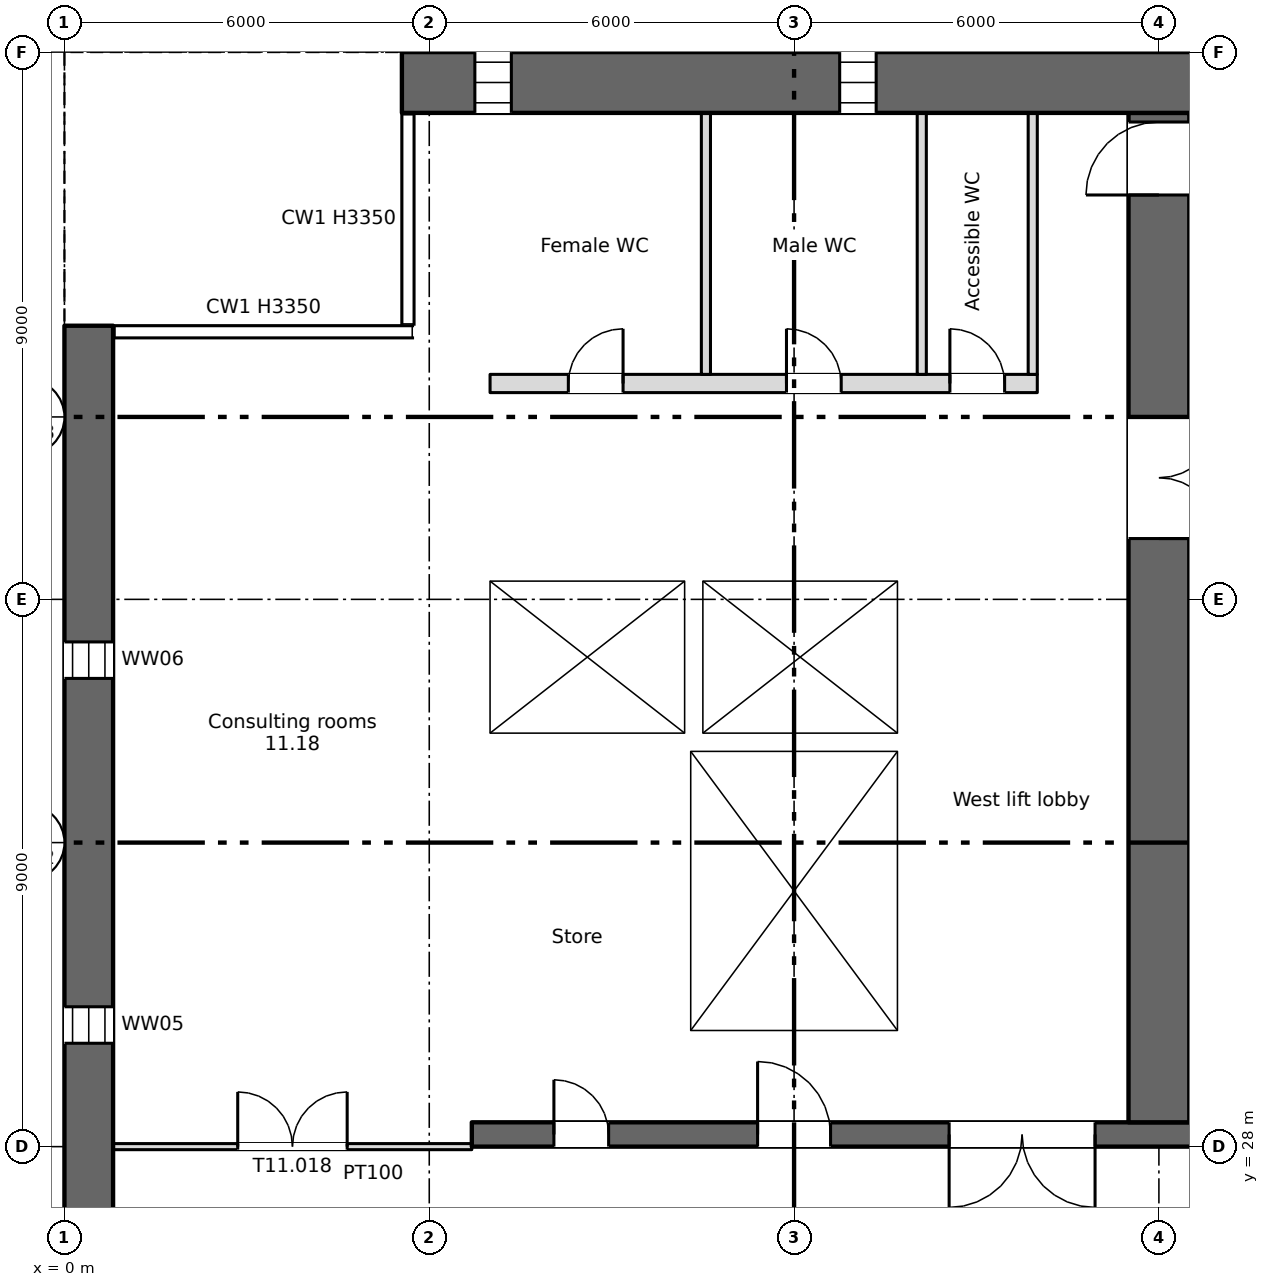
"""IFC4 building model, lengths in metres.
Left out: names, types, materials, properties, quantities, classifications, styles, units other than length and angle.
Written with IfcOpenShell. Run it as: python <this file> out.ifc"""

import sys

from ifc_helpers import new_model, si_unit, direction, frame, frame_2d, origin, place, context, subcontext, project, spatial, rectangle, extrude, element, fill, save


model = new_model("IFC4")
c1 = context("Model", 3, precision=1e-05, world=origin(), true_north=direction((0.0, 1.0)))
c2 = subcontext(c1, "Body", "Model", "MODEL_VIEW")
j1 = project(units=[si_unit("LENGTHUNIT", "METRE"), si_unit("PLANEANGLEUNIT", "RADIAN")], contexts=[c1])
p1 = place(None, origin())
s1 = spatial("IfcSite", under=j1, at=p1, CompositionType="ELEMENT")
p2 = place(p1, origin())
s2 = spatial("IfcBuilding", under=s1, at=p2, CompositionType="ELEMENT")
p3 = place(p2, frame((0.0, 0.0, 52.5)))
s3 = spatial("IfcBuildingStorey", under=s2, at=p3, CompositionType="ELEMENT", Elevation=52.5)
p4 = place(p3, frame((0.4, 4.5, 0.0), z_axis=(0.0, 0.0, 1.0), x_axis=(0.0, 1.0, 0.0)))
e1 = element("IfcWall", 1, at=p4, inside=s3, PredefinedType="SHEAR", context=c2, shape_type="SweptSolid", body=[
    extrude(rectangle(XDim=37.0, YDim=0.8, at=frame_2d((18.5, 0.0))), origin(), (0.0, 0.0, 1.0), 3.35),
])
p5 = place(p4, frame((1.2, 0.0, 0.6)))
e2 = element("IfcOpeningElement", 2, at=p5, cuts=e1, PredefinedType="OPENING", context=c2, shape_type="SweptSolid", body=[
    extrude(rectangle(XDim=0.6, YDim=2.4, at=frame_2d((0.3, 1.2))), frame((0.0, 0.41, 0.0), z_axis=(0.0, -1.0, 0.0), x_axis=(1.0, 0.0, 0.0)), (0.0, 0.0, 1.0), 0.82),
])
p6 = place(p4, frame((7.2, 0.0, 0.6)))
e3 = element("IfcOpeningElement", 3, at=p6, cuts=e1, PredefinedType="OPENING", context=c2, shape_type="SweptSolid", body=[
    extrude(rectangle(XDim=0.6, YDim=2.4, at=frame_2d((0.3, 1.2))), frame((0.0, 0.41, 0.0), z_axis=(0.0, -1.0, 0.0), x_axis=(1.0, 0.0, 0.0)), (0.0, 0.0, 1.0), 0.82),
])
p7 = place(p4, frame((13.2, 0.0, 0.6)))
e4 = element("IfcOpeningElement", 4, at=p7, cuts=e1, PredefinedType="OPENING", context=c2, shape_type="SweptSolid", body=[
    extrude(rectangle(XDim=0.6, YDim=2.4, at=frame_2d((0.3, 1.2))), frame((0.0, 0.41, 0.0), z_axis=(0.0, -1.0, 0.0), x_axis=(1.0, 0.0, 0.0)), (0.0, 0.0, 1.0), 0.82),
])
p8 = place(p4, frame((19.2, 0.0, 0.6)))
e5 = element("IfcOpeningElement", 5, at=p8, cuts=e1, PredefinedType="OPENING", context=c2, shape_type="SweptSolid", body=[
    extrude(rectangle(XDim=0.6, YDim=2.4, at=frame_2d((0.3, 1.2))), frame((0.0, 0.41, 0.0), z_axis=(0.0, -1.0, 0.0), x_axis=(1.0, 0.0, 0.0)), (0.0, 0.0, 1.0), 0.82),
])
p9 = place(p4, frame((25.2, 0.0, 0.6)))
e6 = element("IfcOpeningElement", 6, at=p9, cuts=e1, PredefinedType="OPENING", context=c2, shape_type="SweptSolid", body=[
    extrude(rectangle(XDim=0.6, YDim=2.4, at=frame_2d((0.3, 1.2))), frame((0.0, 0.41, 0.0), z_axis=(0.0, -1.0, 0.0), x_axis=(1.0, 0.0, 0.0)), (0.0, 0.0, 1.0), 0.82),
])
p10 = place(p4, frame((31.2, 0.0, 0.6)))
e7 = element("IfcOpeningElement", 7, at=p10, cuts=e1, PredefinedType="OPENING", context=c2, shape_type="SweptSolid", body=[
    extrude(rectangle(XDim=0.6, YDim=2.4, at=frame_2d((0.3, 1.2))), frame((0.0, 0.41, 0.0), z_axis=(0.0, -1.0, 0.0), x_axis=(1.0, 0.0, 0.0)), (0.0, 0.0, 1.0), 0.82),
])
p11 = place(p3, frame((5.55, 45.5, 0.0), z_axis=(0.0, 0.0, 1.0), x_axis=(1.0, 0.0, 0.0)))
e8 = element("IfcWall", 8, at=p11, inside=s3, PredefinedType="SHEAR", context=c2, shape_type="SweptSolid", body=[
    extrude(rectangle(XDim=66.9, YDim=1.0, at=frame_2d((33.45, 0.0))), origin(), (0.0, 0.0, 1.0), 3.35),
])
p12 = place(p11, frame((1.2, 0.0, 0.6)))
e9 = element("IfcOpeningElement", 9, at=p12, cuts=e8, PredefinedType="OPENING", context=c2, shape_type="SweptSolid", body=[
    extrude(rectangle(XDim=0.6, YDim=2.4, at=frame_2d((0.3, 1.2))), frame((0.0, 0.51, 0.0), z_axis=(0.0, -1.0, 0.0), x_axis=(1.0, 0.0, 0.0)), (0.0, 0.0, 1.0), 1.02),
])
p13 = place(p11, frame((7.2, 0.0, 0.6)))
e10 = element("IfcOpeningElement", 10, at=p13, cuts=e8, PredefinedType="OPENING", context=c2, shape_type="SweptSolid", body=[
    extrude(rectangle(XDim=0.6, YDim=2.4, at=frame_2d((0.3, 1.2))), frame((0.0, 0.51, 0.0), z_axis=(0.0, -1.0, 0.0), x_axis=(1.0, 0.0, 0.0)), (0.0, 0.0, 1.0), 1.02),
])
p14 = place(p11, frame((61.2, 0.0, 0.6)))
e11 = element("IfcOpeningElement", 11, at=p14, cuts=e8, PredefinedType="OPENING", context=c2, shape_type="SweptSolid", body=[
    extrude(rectangle(XDim=0.6, YDim=2.4, at=frame_2d((0.3, 1.2))), frame((0.0, 0.51, 0.0), z_axis=(0.0, -1.0, 0.0), x_axis=(1.0, 0.0, 0.0)), (0.0, 0.0, 1.0), 1.02),
])
p15 = place(p3, frame((6.7, 28.2, 0.0), z_axis=(0.0, 0.0, 1.0), x_axis=(1.0, 0.0, 0.0)))
e12 = element("IfcWall", 12, at=p15, inside=s3, PredefinedType="SHEAR", context=c2, shape_type="SweptSolid", body=[
    extrude(rectangle(XDim=57.8, YDim=0.4, at=frame_2d((28.9, 0.0))), origin(), (0.0, 0.0, 1.0), 3.35),
])
p16 = place(p15, frame((13.85, 0.0, 0.0)))
e13 = element("IfcOpeningElement", 13, at=p16, cuts=e12, PredefinedType="OPENING", context=c2, shape_type="SweptSolid", body=[
    extrude(rectangle(XDim=0.9, YDim=2.1, at=frame_2d((0.45, 1.05))), frame((0.0, 0.21, 0.0), z_axis=(0.0, -1.0, 0.0), x_axis=(1.0, 0.0, 0.0)), (0.0, 0.0, 1.0), 0.42),
])
p17 = place(p15, frame((48.562, 0.0, 0.0)))
e14 = element("IfcOpeningElement", 14, at=p17, cuts=e12, PredefinedType="OPENING", context=c2, shape_type="SweptSolid", body=[
    extrude(rectangle(XDim=0.9, YDim=2.1, at=frame_2d((0.45, 1.05))), frame((0.0, 0.21, 0.0), z_axis=(0.0, -1.0, 0.0), x_axis=(1.0, 0.0, 0.0)), (0.0, 0.0, 1.0), 0.42),
])
p18 = place(p15, frame((51.137, 0.0, 0.0)))
e15 = element("IfcOpeningElement", 15, at=p18, cuts=e12, PredefinedType="OPENING", context=c2, shape_type="SweptSolid", body=[
    extrude(rectangle(XDim=0.9, YDim=2.1, at=frame_2d((0.45, 1.05))), frame((0.0, 0.21, 0.0), z_axis=(0.0, -1.0, 0.0), x_axis=(1.0, 0.0, 0.0)), (0.0, 0.0, 1.0), 0.42),
])
p19 = place(p15, frame((1.35, 0.0, 0.0)))
e16 = element("IfcOpeningElement", 16, at=p19, cuts=e12, PredefinedType="OPENING", context=c2, shape_type="SweptSolid", body=[
    extrude(rectangle(XDim=0.9, YDim=2.1, at=frame_2d((0.45, 1.05))), frame((0.0, 0.21, 0.0), z_axis=(0.0, -1.0, 0.0), x_axis=(1.0, 0.0, 0.0)), (0.0, 0.0, 1.0), 0.42),
])
p20 = place(p15, frame((4.7, 0.0, 0.0)))
e17 = element("IfcOpeningElement", 17, at=p20, cuts=e12, PredefinedType="OPENING", context=c2, shape_type="SweptSolid", body=[
    extrude(rectangle(XDim=1.2, YDim=2.1, at=frame_2d((0.6, 1.05))), frame((0.0, 0.21, 0.0), z_axis=(0.0, -1.0, 0.0), x_axis=(1.0, 0.0, 0.0)), (0.0, 0.0, 1.0), 0.42),
])
p21 = place(p15, frame((31.7, 0.0, 0.0)))
e18 = element("IfcOpeningElement", 18, at=p21, cuts=e12, PredefinedType="OPENING", context=c2, shape_type="SweptSolid", body=[
    extrude(rectangle(XDim=1.2, YDim=2.1, at=frame_2d((0.6, 1.05))), frame((0.0, 0.21, 0.0), z_axis=(0.0, -1.0, 0.0), x_axis=(1.0, 0.0, 0.0)), (0.0, 0.0, 1.0), 0.42),
])
p22 = place(p15, frame((55.2, 0.0, 0.0)))
e19 = element("IfcOpeningElement", 19, at=p22, cuts=e12, PredefinedType="OPENING", context=c2, shape_type="SweptSolid", body=[
    extrude(rectangle(XDim=1.2, YDim=2.1, at=frame_2d((0.6, 1.05))), frame((0.0, 0.21, 0.0), z_axis=(0.0, -1.0, 0.0), x_axis=(1.0, 0.0, 0.0)), (0.0, 0.0, 1.0), 0.42),
])
p23 = place(p15, frame((21.7, 0.0, 0.0)))
e20 = element("IfcOpeningElement", 20, at=p23, cuts=e12, PredefinedType="OPENING", context=c2, shape_type="SweptSolid", body=[
    extrude(rectangle(XDim=1.2, YDim=2.1, at=frame_2d((0.6, 1.05))), frame((0.0, 0.21, 0.0), z_axis=(0.0, -1.0, 0.0), x_axis=(1.0, 0.0, 0.0)), (0.0, 0.0, 1.0), 0.42),
])
p24 = place(p15, frame((41.7, 0.0, 0.0)))
e21 = element("IfcOpeningElement", 21, at=p24, cuts=e12, PredefinedType="OPENING", context=c2, shape_type="SweptSolid", body=[
    extrude(rectangle(XDim=1.2, YDim=2.1, at=frame_2d((0.6, 1.05))), frame((0.0, 0.21, 0.0), z_axis=(0.0, -1.0, 0.0), x_axis=(1.0, 0.0, 0.0)), (0.0, 0.0, 1.0), 0.42),
])
p25 = place(p15, frame((24.85, 0.0, 0.0)))
e22 = element("IfcOpeningElement", 22, at=p25, cuts=e12, PredefinedType="OPENING", context=c2, shape_type="SweptSolid", body=[
    extrude(rectangle(XDim=2.4, YDim=2.1, at=frame_2d((1.2, 1.05))), frame((0.0, 0.21, 0.0), z_axis=(0.0, -1.0, 0.0), x_axis=(1.0, 0.0, 0.0)), (0.0, 0.0, 1.0), 0.42),
])
p26 = place(p15, frame((37.35, 0.0, 0.0)))
e23 = element("IfcOpeningElement", 23, at=p26, cuts=e12, PredefinedType="OPENING", context=c2, shape_type="SweptSolid", body=[
    extrude(rectangle(XDim=2.4, YDim=2.1, at=frame_2d((1.2, 1.05))), frame((0.0, 0.21, 0.0), z_axis=(0.0, -1.0, 0.0), x_axis=(1.0, 0.0, 0.0)), (0.0, 0.0, 1.0), 0.42),
])
p27 = place(p15, frame((7.85, 0.0, 0.0)))
e24 = element("IfcOpeningElement", 24, at=p27, cuts=e12, PredefinedType="OPENING", context=c2, shape_type="SweptSolid", body=[
    extrude(rectangle(XDim=2.4, YDim=2.1, at=frame_2d((1.2, 1.05))), frame((0.0, 0.21, 0.0), z_axis=(0.0, -1.0, 0.0), x_axis=(1.0, 0.0, 0.0)), (0.0, 0.0, 1.0), 0.42),
])
p28 = place(p15, frame((28.85, 0.0, 0.0)))
e25 = element("IfcOpeningElement", 25, at=p28, cuts=e12, PredefinedType="OPENING", context=c2, shape_type="SweptSolid", body=[
    extrude(rectangle(XDim=0.9, YDim=2.1, at=frame_2d((0.45, 1.05))), frame((0.0, 0.21, 0.0), z_axis=(0.0, -1.0, 0.0), x_axis=(1.0, 0.0, 0.0)), (0.0, 0.0, 1.0), 0.42),
])
p29 = place(p15, frame((34.85, 0.0, 0.0)))
e26 = element("IfcOpeningElement", 26, at=p29, cuts=e12, PredefinedType="OPENING", context=c2, shape_type="SweptSolid", body=[
    extrude(rectangle(XDim=0.9, YDim=2.1, at=frame_2d((0.45, 1.05))), frame((0.0, 0.21, 0.0), z_axis=(0.0, -1.0, 0.0), x_axis=(1.0, 0.0, 0.0)), (0.0, 0.0, 1.0), 0.42),
])
p30 = place(p3, frame((6.85, 28.4, 0.0), z_axis=(0.0, 0.0, 1.0), x_axis=(0.0, 1.0, 0.0)))
e27 = element("IfcWall", 27, at=p30, inside=s3, PredefinedType="SHEAR", context=c2, shape_type="SweptSolid", body=[
    extrude(rectangle(XDim=16.6, YDim=0.3, at=frame_2d((8.3, 0.0))), origin(), (0.0, 0.0, 1.0), 3.35),
])
p31 = place(p3, frame((18.0, 28.4, 0.0), z_axis=(0.0, 0.0, 1.0), x_axis=(0.0, 1.0, 0.0)))
e28 = element("IfcWall", 28, at=p31, inside=s3, PredefinedType="SHEAR", context=c2, shape_type="SweptSolid", body=[
    extrude(rectangle(XDim=16.6, YDim=1.0, at=frame_2d((8.3, 0.0))), origin(), (0.0, 0.0, 1.0), 3.35),
])
p32 = place(p31, frame((9.6, 0.0, 0.0)))
e29 = element("IfcOpeningElement", 29, at=p32, cuts=e28, PredefinedType="OPENING", context=c2, shape_type="SweptSolid", body=[
    extrude(rectangle(XDim=2.0, YDim=2.1, at=frame_2d((1.0, 1.05))), frame((0.0, 0.51, 0.0), z_axis=(0.0, -1.0, 0.0), x_axis=(1.0, 0.0, 0.0)), (0.0, 0.0, 1.0), 1.02),
])
p33 = place(p31, frame((15.25, 0.0, 0.0)))
e30 = element("IfcOpeningElement", 30, at=p33, cuts=e28, PredefinedType="OPENING", context=c2, shape_type="SweptSolid", body=[
    extrude(rectangle(XDim=1.2, YDim=2.1, at=frame_2d((0.6, 1.05))), frame((0.0, 0.51, 0.0), z_axis=(0.0, -1.0, 0.0), x_axis=(1.0, 0.0, 0.0)), (0.0, 0.0, 1.0), 1.02),
])
for number, where, z_axis, x_axis in (
    (31, (10.15, 28.4, 0.0), (0.0, 0.0, 1.0), (0.0, 1.0, 0.0)),
    (32, (13.85, 28.4, 0.0), (0.0, 0.0, 1.0), (0.0, 1.0, 0.0)),
):
    element("IfcWall", number, at=place(p3, frame(where, z_axis=z_axis, x_axis=x_axis)), inside=s3, PredefinedType="SHEAR", context=c2, shape_type="SweptSolid", body=[
        extrude(rectangle(XDim=6.1, YDim=0.3, at=frame_2d((3.05, 0.0))), origin(), (0.0, 0.0, 1.0), 3.35),
    ])
for number, where, z_axis, x_axis in (
    (33, (7.0, 34.65, 0.0), (0.0, 0.0, 1.0), (1.0, 0.0, 0.0)),
    (34, (7.0, 37.45, 0.0), (0.0, 0.0, 1.0), (1.0, 0.0, 0.0)),
):
    element("IfcWall", number, at=place(p3, frame(where, z_axis=z_axis, x_axis=x_axis)), inside=s3, PredefinedType="SHEAR", context=c2, shape_type="SweptSolid", body=[
        extrude(rectangle(XDim=7.0, YDim=0.3, at=frame_2d((3.5, 0.0))), origin(), (0.0, 0.0, 1.0), 3.35),
    ])
p34 = place(p3, frame((13.85, 34.8, 0.0), z_axis=(0.0, 0.0, 1.0), x_axis=(0.0, 1.0, 0.0)))
e35 = element("IfcWall", 35, at=p34, inside=s3, PredefinedType="SHEAR", context=c2, shape_type="SweptSolid", body=[
    extrude(rectangle(XDim=2.5, YDim=0.3, at=frame_2d((1.25, 0.0))), origin(), (0.0, 0.0, 1.0), 3.35),
])
p35 = place(p3, frame((7.0, 40.55, 0.0), z_axis=(0.0, 0.0, 1.0), x_axis=(1.0, 0.0, 0.0)))
e36 = element("IfcWall", 36, at=p35, inside=s3, PredefinedType="PARTITIONING", context=c2, shape_type="SweptSolid", body=[
    extrude(rectangle(XDim=9.0, YDim=0.3, at=frame_2d((4.5, 0.0))), origin(), (0.0, 0.0, 1.0), 3.35),
])
p36 = place(p35, frame((1.288, 0.0, 0.0)))
e37 = element("IfcOpeningElement", 37, at=p36, cuts=e36, PredefinedType="OPENING", context=c2, shape_type="SweptSolid", body=[
    extrude(rectangle(XDim=0.9, YDim=2.1, at=frame_2d((0.45, 1.05))), frame((0.0, 0.16, 0.0), z_axis=(0.0, -1.0, 0.0), x_axis=(1.0, 0.0, 0.0)), (0.0, 0.0, 1.0), 0.32),
])
p37 = place(p35, frame((4.875, 0.0, 0.0)))
e38 = element("IfcOpeningElement", 38, at=p37, cuts=e36, PredefinedType="OPENING", context=c2, shape_type="SweptSolid", body=[
    extrude(rectangle(XDim=0.9, YDim=2.1, at=frame_2d((0.45, 1.05))), frame((0.0, 0.16, 0.0), z_axis=(0.0, -1.0, 0.0), x_axis=(1.0, 0.0, 0.0)), (0.0, 0.0, 1.0), 0.32),
])
p38 = place(p35, frame((7.562, 0.0, 0.0)))
e39 = element("IfcOpeningElement", 39, at=p38, cuts=e36, PredefinedType="OPENING", context=c2, shape_type="SweptSolid", body=[
    extrude(rectangle(XDim=0.9, YDim=2.1, at=frame_2d((0.45, 1.05))), frame((0.0, 0.16, 0.0), z_axis=(0.0, -1.0, 0.0), x_axis=(1.0, 0.0, 0.0)), (0.0, 0.0, 1.0), 0.32),
])
p39 = place(p3, frame((10.35, 34.8, 0.0), z_axis=(0.0, 0.0, 1.0), x_axis=(0.0, 1.0, 0.0)))
e40 = element("IfcWall", 40, at=p39, inside=s3, PredefinedType="SHEAR", context=c2, shape_type="SweptSolid", body=[
    extrude(rectangle(XDim=2.5, YDim=0.3, at=frame_2d((1.25, 0.0))), origin(), (0.0, 0.0, 1.0), 3.35),
])
for number, where, z_axis, x_axis in (
    (41, (15.925, 40.7, 0.0), (0.0, 0.0, 1.0), (0.0, 1.0, 0.0)),
    (42, (10.55, 40.7, 0.0), (0.0, 0.0, 1.0), (0.0, 1.0, 0.0)),
    (43, (14.1, 40.7, 0.0), (0.0, 0.0, 1.0), (0.0, 1.0, 0.0)),
):
    element("IfcWall", number, at=place(p3, frame(where, z_axis=z_axis, x_axis=x_axis)), inside=s3, PredefinedType="PARTITIONING", context=c2, shape_type="SweptSolid", body=[
        extrude(rectangle(XDim=4.3, YDim=0.15, at=frame_2d((2.15, 0.0))), origin(), (0.0, 0.0, 1.0), 3.35),
    ])
p40 = place(p3, frame((0.8, 28.0, 0.0), z_axis=(0.0, 0.0, 1.0), x_axis=(1.0, 0.0, 0.0)))
e44 = element("IfcWall", 44, at=p40, inside=s3, PredefinedType="PARTITIONING", context=c2, shape_type="SweptSolid", body=[
    extrude(rectangle(XDim=5.9, YDim=0.1, at=frame_2d((2.95, 0.0))), origin(), (0.0, 0.0, 1.0), 3.35),
])
p41 = place(p40, frame((2.05, 0.0, 0.0)))
e45 = element("IfcOpeningElement", 45, at=p41, cuts=e44, PredefinedType="OPENING", context=c2, shape_type="SweptSolid", body=[
    extrude(rectangle(XDim=1.8, YDim=2.1, at=frame_2d((0.9, 1.05))), frame((0.0, 0.06, 0.0), z_axis=(0.0, -1.0, 0.0), x_axis=(1.0, 0.0, 0.0)), (0.0, 0.0, 1.0), 0.12),
])
p42 = place(p12, origin())
e46 = element("IfcWindow", 46, at=p42, inside=s3, PartitioningType="SINGLE_PANEL", PredefinedType="WINDOW", context=c2, shape_type="SweptSolid", body=[
    extrude(rectangle(XDim=0.6, YDim=2.4, at=frame_2d((0.3, 1.2))), frame((0.0, 0.03, 0.0), z_axis=(0.0, -1.0, 0.0), x_axis=(1.0, 0.0, 0.0)), (0.0, 0.0, 1.0), 0.06),
])
fill(e9, e46)
p43 = place(p13, origin())
e47 = element("IfcWindow", 47, at=p43, inside=s3, PartitioningType="SINGLE_PANEL", PredefinedType="WINDOW", context=c2, shape_type="SweptSolid", body=[
    extrude(rectangle(XDim=0.6, YDim=2.4, at=frame_2d((0.3, 1.2))), frame((0.0, 0.03, 0.0), z_axis=(0.0, -1.0, 0.0), x_axis=(1.0, 0.0, 0.0)), (0.0, 0.0, 1.0), 0.06),
])
fill(e10, e47)
p44 = place(p9, origin())
e48 = element("IfcWindow", 48, at=p44, inside=s3, PartitioningType="SINGLE_PANEL", PredefinedType="WINDOW", context=c2, shape_type="SweptSolid", body=[
    extrude(rectangle(XDim=0.6, YDim=2.4, at=frame_2d((0.3, 1.2))), frame((0.0, 0.03, 0.0), z_axis=(0.0, -1.0, 0.0), x_axis=(1.0, 0.0, 0.0)), (0.0, 0.0, 1.0), 0.06),
])
fill(e6, e48)
p45 = place(p10, origin())
e49 = element("IfcWindow", 49, at=p45, inside=s3, PartitioningType="SINGLE_PANEL", PredefinedType="WINDOW", context=c2, shape_type="SweptSolid", body=[
    extrude(rectangle(XDim=0.6, YDim=2.4, at=frame_2d((0.3, 1.2))), frame((0.0, 0.03, 0.0), z_axis=(0.0, -1.0, 0.0), x_axis=(1.0, 0.0, 0.0)), (0.0, 0.0, 1.0), 0.06),
])
fill(e7, e49)
p46 = place(p19, origin())
e50 = element("IfcDoor", 50, at=p46, inside=s3, OperationType="SINGLE_SWING_LEFT", PredefinedType="DOOR", context=c2, shape_type="SweptSolid", body=[
    extrude(rectangle(XDim=0.9, YDim=2.1, at=frame_2d((0.45, 1.05))), frame((0.0, 0.025, 0.0), z_axis=(0.0, -1.0, 0.0), x_axis=(1.0, 0.0, 0.0)), (0.0, 0.0, 1.0), 0.05),
])
fill(e16, e50)
p47 = place(p36, origin())
e51 = element("IfcDoor", 51, at=p47, inside=s3, OperationType="SINGLE_SWING_RIGHT", PredefinedType="DOOR", context=c2, shape_type="SweptSolid", body=[
    extrude(rectangle(XDim=0.9, YDim=2.1, at=frame_2d((0.45, 1.05))), frame((0.0, 0.025, 0.0), z_axis=(0.0, -1.0, 0.0), x_axis=(1.0, 0.0, 0.0)), (0.0, 0.0, 1.0), 0.05),
])
fill(e37, e51)
p48 = place(p37, origin())
e52 = element("IfcDoor", 52, at=p48, inside=s3, OperationType="SINGLE_SWING_LEFT", PredefinedType="DOOR", context=c2, shape_type="SweptSolid", body=[
    extrude(rectangle(XDim=0.9, YDim=2.1, at=frame_2d((0.45, 1.05))), frame((0.0, 0.025, 0.0), z_axis=(0.0, -1.0, 0.0), x_axis=(1.0, 0.0, 0.0)), (0.0, 0.0, 1.0), 0.05),
])
fill(e38, e52)
p49 = place(p38, origin())
e53 = element("IfcDoor", 53, at=p49, inside=s3, OperationType="SINGLE_SWING_LEFT", PredefinedType="DOOR", context=c2, shape_type="SweptSolid", body=[
    extrude(rectangle(XDim=0.9, YDim=2.1, at=frame_2d((0.45, 1.05))), frame((0.0, 0.025, 0.0), z_axis=(0.0, -1.0, 0.0), x_axis=(1.0, 0.0, 0.0)), (0.0, 0.0, 1.0), 0.05),
])
fill(e39, e53)
p50 = place(p20, origin())
e54 = element("IfcDoor", 54, at=p50, inside=s3, OperationType="SINGLE_SWING_LEFT", PredefinedType="DOOR", context=c2, shape_type="SweptSolid", body=[
    extrude(rectangle(XDim=1.2, YDim=2.1, at=frame_2d((0.6, 1.05))), frame((0.0, 0.025, 0.0), z_axis=(0.0, -1.0, 0.0), x_axis=(1.0, 0.0, 0.0)), (0.0, 0.0, 1.0), 0.05),
])
fill(e17, e54)
p51 = place(p27, origin())
e55 = element("IfcDoor", 55, at=p51, inside=s3, OperationType="DOUBLE_DOOR_SINGLE_SWING", PredefinedType="DOOR", context=c2, shape_type="SweptSolid", body=[
    extrude(rectangle(XDim=2.4, YDim=2.1, at=frame_2d((1.2, 1.05))), frame((0.0, 0.025, 0.0), z_axis=(0.0, -1.0, 0.0), x_axis=(1.0, 0.0, 0.0)), (0.0, 0.0, 1.0), 0.05),
])
fill(e24, e55)
p52 = place(p32, origin())
e56 = element("IfcDoor", 56, at=p52, inside=s3, OperationType="DOUBLE_DOOR_SINGLE_SWING", PredefinedType="DOOR", context=c2, shape_type="SweptSolid", body=[
    extrude(rectangle(XDim=2.0, YDim=2.1, at=frame_2d((1.0, 1.05))), frame((0.0, 0.025, 0.0), z_axis=(0.0, -1.0, 0.0), x_axis=(1.0, 0.0, 0.0)), (0.0, 0.0, 1.0), 0.05),
])
fill(e29, e56)
p53 = place(p33, origin())
e57 = element("IfcDoor", 57, at=p53, inside=s3, OperationType="SINGLE_SWING_LEFT", PredefinedType="DOOR", context=c2, shape_type="SweptSolid", body=[
    extrude(rectangle(XDim=1.2, YDim=2.1, at=frame_2d((0.6, 1.05))), frame((0.0, 0.025, 0.0), z_axis=(0.0, -1.0, 0.0), x_axis=(1.0, 0.0, 0.0)), (0.0, 0.0, 1.0), 0.05),
])
fill(e30, e57)
p54 = place(p41, origin())
e58 = element("IfcDoor", 58, at=p54, inside=s3, OperationType="DOUBLE_DOOR_SINGLE_SWING", PredefinedType="DOOR", context=c2, shape_type="SweptSolid", body=[
    extrude(rectangle(XDim=1.8, YDim=2.1, at=frame_2d((0.9, 1.05))), frame((0.0, 0.025, 0.0), z_axis=(0.0, -1.0, 0.0), x_axis=(1.0, 0.0, 0.0)), (0.0, 0.0, 1.0), 0.05),
])
fill(e45, e58)
save(model, sys.argv[1])
